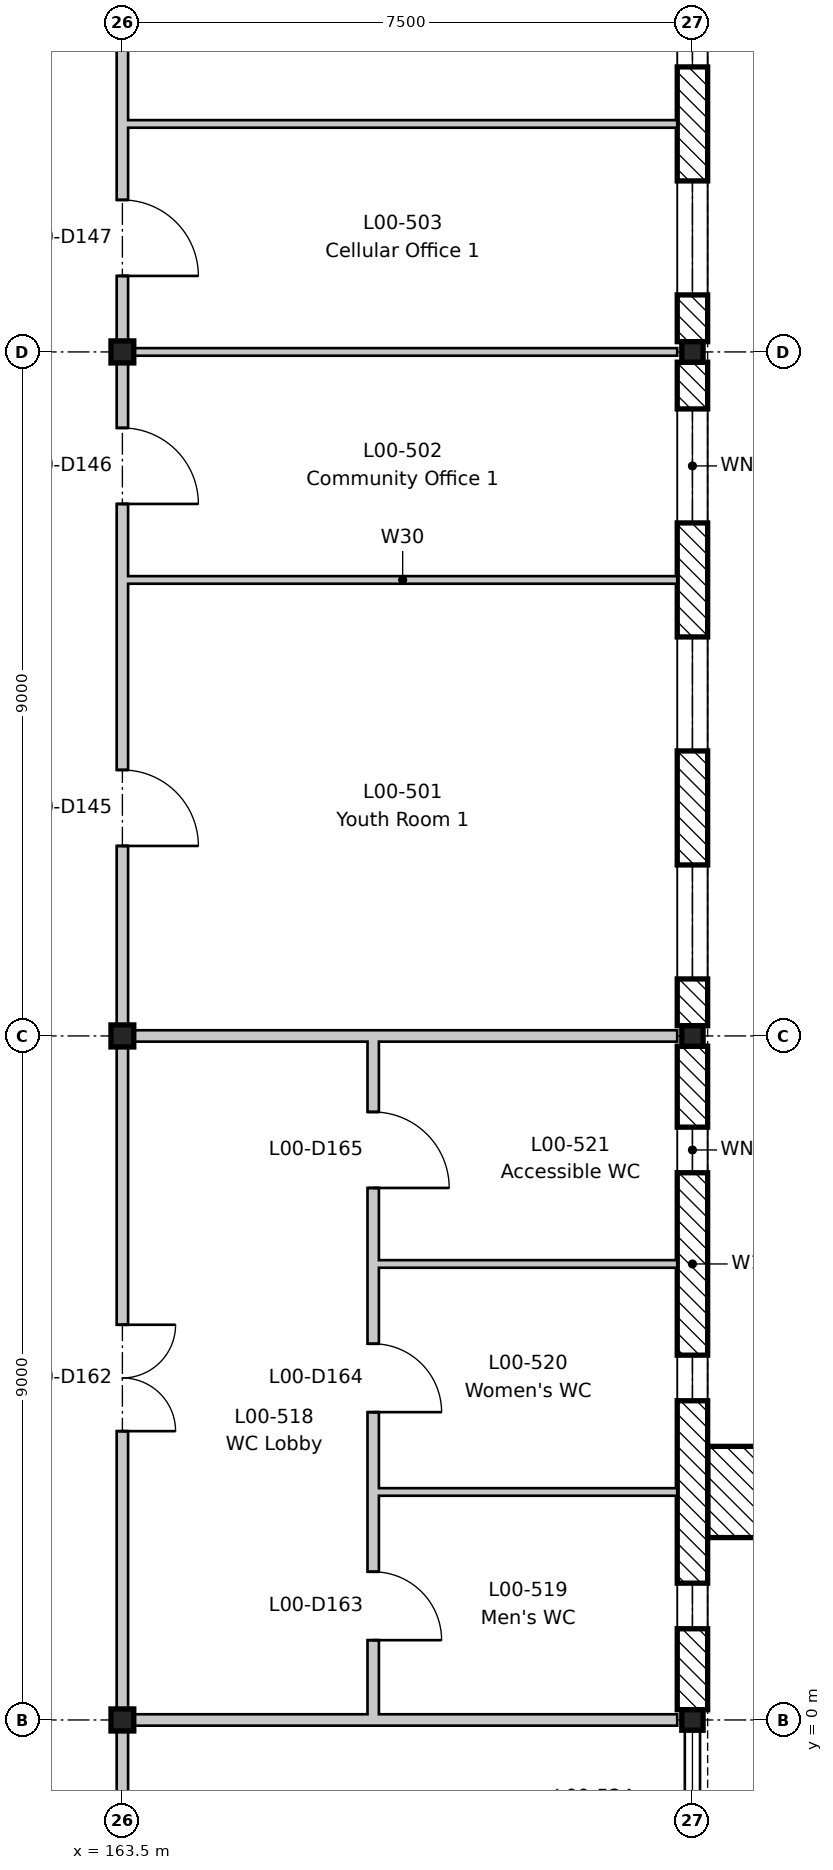
"""IFC4 building model, lengths in metres.
Left out: names, types, materials, properties, quantities, classifications, styles, units other than length and angle.
Written with IfcOpenShell. Run it as: python <this file> out.ifc"""

import sys

from ifc_helpers import new_model, si_unit, direction, frame, frame_2d, origin, origin_2d, place, context, subcontext, project, spatial, rectangle, i_section, extrude, element, fill, save


model = new_model("IFC4")
c1 = context("Model", 3, precision=1e-05, world=origin(), true_north=direction((0.0, 1.0)))
c2 = subcontext(c1, "Body", "Model", "MODEL_VIEW")
j1 = project(units=[si_unit("LENGTHUNIT", "METRE"), si_unit("PLANEANGLEUNIT", "RADIAN")], contexts=[c1])
p1 = place(None, origin())
s1 = spatial("IfcSite", under=j1, at=p1, CompositionType="ELEMENT")
p2 = place(p1, origin())
s2 = spatial("IfcBuilding", under=s1, at=p2, CompositionType="ELEMENT")
p3 = place(p2, origin())
s3 = spatial("IfcBuildingStorey", under=s2, at=p3, CompositionType="ELEMENT", Elevation=0.0)
for number, where, z_axis, x_axis in (
    (1, (163.5, 0.0, -0.6), (0.0, 0.0, 1.0), (1.0, 0.0, 0.0)),
    (2, (163.5, 9.0, -0.6), (0.0, 0.0, 1.0), (1.0, 0.0, 0.0)),
    (3, (163.5, 18.0, -0.6), (0.0, 0.0, 1.0), (1.0, 0.0, 0.0)),
):
    element("IfcColumn", number, at=place(p3, frame(where, z_axis=z_axis, x_axis=x_axis)), inside=s3, PredefinedType="COLUMN", context=c2, shape_type="SweptSolid", body=[
        extrude(i_section(OverallWidth=0.3, OverallDepth=0.29, WebThickness=0.009, FlangeThickness=0.014, FilletRadius=0.027, at=origin_2d()), origin(), (0.0, 0.0, 1.0), 5.8),
    ])
for number, where, z_axis, x_axis in (
    (4, (171.0, 0.0, -0.6), (0.0, 0.0, 1.0), (1.0, 0.0, 0.0)),
    (5, (171.0, 9.0, -0.6), (0.0, 0.0, 1.0), (1.0, 0.0, 0.0)),
    (6, (171.0, 18.0, -0.6), (0.0, 0.0, 1.0), (1.0, 0.0, 0.0)),
):
    element("IfcColumn", number, at=place(p3, frame(where, z_axis=z_axis, x_axis=x_axis)), inside=s3, PredefinedType="COLUMN", context=c2, shape_type="SweptSolid", body=[
        extrude(i_section(OverallWidth=0.28, OverallDepth=0.27, WebThickness=0.008, FlangeThickness=0.013, FilletRadius=0.024, at=origin_2d()), origin(), (0.0, 0.0, 1.0), 5.8),
    ])
p4 = place(p3, frame((171.0, 8.865, 0.0), z_axis=(0.0, 0.0, 1.0), x_axis=(0.0, -1.0, 0.0)))
e7 = element("IfcWall", 7, at=p4, inside=s3, PredefinedType="STANDARD", context=c2, shape_type="SweptSolid", body=[
    extrude(rectangle(XDim=8.73, YDim=0.4, at=frame_2d((4.365, 0.0))), origin(), (0.0, 0.0, 1.0), 4.8),
])
p5 = place(p4, frame((7.065, 0.0, 1.5)))
e8 = element("IfcOpeningElement", 8, at=p5, cuts=e7, PredefinedType="OPENING", context=c2, shape_type="SweptSolid", body=[
    extrude(rectangle(XDim=0.6, YDim=1.2, at=frame_2d((0.3, 0.6))), frame((0.0, 0.21, 0.0), z_axis=(0.0, -1.0, 0.0), x_axis=(1.0, 0.0, 0.0)), (0.0, 0.0, 1.0), 0.42),
])
p6 = place(p4, frame((4.065, 0.0, 1.5)))
e9 = element("IfcOpeningElement", 9, at=p6, cuts=e7, PredefinedType="OPENING", context=c2, shape_type="SweptSolid", body=[
    extrude(rectangle(XDim=0.6, YDim=1.2, at=frame_2d((0.3, 0.6))), frame((0.0, 0.21, 0.0), z_axis=(0.0, -1.0, 0.0), x_axis=(1.0, 0.0, 0.0)), (0.0, 0.0, 1.0), 0.42),
])
p7 = place(p4, frame((1.065, 0.0, 1.5)))
e10 = element("IfcOpeningElement", 10, at=p7, cuts=e7, PredefinedType="OPENING", context=c2, shape_type="SweptSolid", body=[
    extrude(rectangle(XDim=0.6, YDim=1.2, at=frame_2d((0.3, 0.6))), frame((0.0, 0.21, 0.0), z_axis=(0.0, -1.0, 0.0), x_axis=(1.0, 0.0, 0.0)), (0.0, 0.0, 1.0), 0.42),
])
p8 = place(p3, frame((171.0, 17.865, 0.0), z_axis=(0.0, 0.0, 1.0), x_axis=(0.0, -1.0, 0.0)))
e11 = element("IfcWall", 11, at=p8, inside=s3, PredefinedType="STANDARD", context=c2, shape_type="SweptSolid", body=[
    extrude(rectangle(XDim=8.73, YDim=0.4, at=frame_2d((4.365, 0.0))), origin(), (0.0, 0.0, 1.0), 4.8),
])
p9 = place(p8, frame((6.615, 0.0, 0.3)))
e12 = element("IfcOpeningElement", 12, at=p9, cuts=e11, PredefinedType="OPENING", context=c2, shape_type="SweptSolid", body=[
    extrude(rectangle(XDim=1.5, YDim=3.3, at=frame_2d((0.75, 1.65))), frame((0.0, 0.21, 0.0), z_axis=(0.0, -1.0, 0.0), x_axis=(1.0, 0.0, 0.0)), (0.0, 0.0, 1.0), 0.42),
])
p10 = place(p8, frame((3.615, 0.0, 0.3)))
e13 = element("IfcOpeningElement", 13, at=p10, cuts=e11, PredefinedType="OPENING", context=c2, shape_type="SweptSolid", body=[
    extrude(rectangle(XDim=1.5, YDim=3.3, at=frame_2d((0.75, 1.65))), frame((0.0, 0.21, 0.0), z_axis=(0.0, -1.0, 0.0), x_axis=(1.0, 0.0, 0.0)), (0.0, 0.0, 1.0), 0.42),
])
p11 = place(p8, frame((0.615, 0.0, 0.3)))
e14 = element("IfcOpeningElement", 14, at=p11, cuts=e11, PredefinedType="OPENING", context=c2, shape_type="SweptSolid", body=[
    extrude(rectangle(XDim=1.5, YDim=3.3, at=frame_2d((0.75, 1.65))), frame((0.0, 0.21, 0.0), z_axis=(0.0, -1.0, 0.0), x_axis=(1.0, 0.0, 0.0)), (0.0, 0.0, 1.0), 0.42),
])
p12 = place(p3, frame((171.0, 26.865, 0.0), z_axis=(0.0, 0.0, 1.0), x_axis=(0.0, -1.0, 0.0)))
e15 = element("IfcWall", 15, at=p12, inside=s3, PredefinedType="STANDARD", context=c2, shape_type="SweptSolid", body=[
    extrude(rectangle(XDim=8.73, YDim=0.4, at=frame_2d((4.365, 0.0))), origin(), (0.0, 0.0, 1.0), 4.8),
])
p13 = place(p12, frame((6.615, 0.0, 0.3)))
e16 = element("IfcOpeningElement", 16, at=p13, cuts=e15, PredefinedType="OPENING", context=c2, shape_type="SweptSolid", body=[
    extrude(rectangle(XDim=1.5, YDim=3.3, at=frame_2d((0.75, 1.65))), frame((0.0, 0.21, 0.0), z_axis=(0.0, -1.0, 0.0), x_axis=(1.0, 0.0, 0.0)), (0.0, 0.0, 1.0), 0.42),
])
p14 = place(p12, frame((3.615, 0.0, 0.3)))
e17 = element("IfcOpeningElement", 17, at=p14, cuts=e15, PredefinedType="OPENING", context=c2, shape_type="SweptSolid", body=[
    extrude(rectangle(XDim=1.5, YDim=3.3, at=frame_2d((0.75, 1.65))), frame((0.0, 0.21, 0.0), z_axis=(0.0, -1.0, 0.0), x_axis=(1.0, 0.0, 0.0)), (0.0, 0.0, 1.0), 0.42),
])
p15 = place(p12, frame((0.615, 0.0, 0.3)))
e18 = element("IfcOpeningElement", 18, at=p15, cuts=e15, PredefinedType="OPENING", context=c2, shape_type="SweptSolid", body=[
    extrude(rectangle(XDim=1.5, YDim=3.3, at=frame_2d((0.75, 1.65))), frame((0.0, 0.21, 0.0), z_axis=(0.0, -1.0, 0.0), x_axis=(1.0, 0.0, 0.0)), (0.0, 0.0, 1.0), 0.42),
])
p16 = place(p3, frame((171.8, 2.4, 0.0), z_axis=(0.0, 0.0, 1.0), x_axis=(0.0, 1.0, 0.0)))
e19 = element("IfcWall", 19, at=p16, inside=s3, PredefinedType="STANDARD", context=c2, shape_type="SweptSolid", body=[
    extrude(rectangle(XDim=1.2, YDim=1.2, at=frame_2d((0.6, 0.0))), origin(), (0.0, 0.0, 1.0), 5.4),
])
p17 = place(p3, frame((163.575, 9.0, 0.0), z_axis=(0.0, 0.0, 1.0), x_axis=(1.0, 0.0, 0.0)))
e20 = element("IfcWall", 20, at=p17, inside=s3, PredefinedType="PARTITIONING", context=c2, shape_type="SweptSolid", body=[
    extrude(rectangle(XDim=7.225, YDim=0.15, at=frame_2d((3.613, 0.0))), origin(), (0.0, 0.0, 1.0), 4.85),
])
p18 = place(p3, frame((163.575, 15.0, 0.0), z_axis=(0.0, 0.0, 1.0), x_axis=(1.0, 0.0, 0.0)))
e21 = element("IfcWall", 21, at=p18, inside=s3, PredefinedType="PARTITIONING", context=c2, shape_type="SweptSolid", body=[
    extrude(rectangle(XDim=7.225, YDim=0.1, at=frame_2d((3.613, 0.0))), origin(), (0.0, 0.0, 1.0), 5.2),
])
p19 = place(p3, frame((163.575, 18.0, 0.0), z_axis=(0.0, 0.0, 1.0), x_axis=(1.0, 0.0, 0.0)))
e22 = element("IfcWall", 22, at=p19, inside=s3, PredefinedType="PARTITIONING", context=c2, shape_type="SweptSolid", body=[
    extrude(rectangle(XDim=7.225, YDim=0.1, at=frame_2d((3.613, 0.0))), origin(), (0.0, 0.0, 1.0), 4.85),
])
p20 = place(p3, frame((163.575, 21.0, 0.0), z_axis=(0.0, 0.0, 1.0), x_axis=(1.0, 0.0, 0.0)))
e23 = element("IfcWall", 23, at=p20, inside=s3, PredefinedType="PARTITIONING", context=c2, shape_type="SweptSolid", body=[
    extrude(rectangle(XDim=7.225, YDim=0.1, at=frame_2d((3.613, 0.0))), origin(), (0.0, 0.0, 1.0), 5.2),
])
p21 = place(p3, frame((163.575, 0.0, 0.0), z_axis=(0.0, 0.0, 1.0), x_axis=(1.0, 0.0, 0.0)))
e24 = element("IfcWall", 24, at=p21, inside=s3, PredefinedType="PARTITIONING", context=c2, shape_type="SweptSolid", body=[
    extrude(rectangle(XDim=7.225, YDim=0.15, at=frame_2d((3.613, 0.0))), origin(), (0.0, 0.0, 1.0), 4.85),
])
p22 = place(p3, frame((163.5, -8.8, 0.0), z_axis=(0.0, 0.0, 1.0), x_axis=(0.0, 1.0, 0.0)))
e25 = element("IfcWall", 25, at=p22, inside=s3, PredefinedType="PARTITIONING", context=c2, shape_type="SweptSolid", body=[
    extrude(rectangle(XDim=62.6, YDim=0.15, at=frame_2d((31.3, 0.0))), origin(), (0.0, 0.0, 1.0), 4.68),
])
p23 = place(p22, frame((20.3, 0.0, 0.0)))
e26 = element("IfcOpeningElement", 26, at=p23, cuts=e25, PredefinedType="OPENING", context=c2, shape_type="SweptSolid", body=[
    extrude(rectangle(XDim=1.0, YDim=2.1, at=frame_2d((0.5, 1.05))), frame((0.0, 0.085, 0.0), z_axis=(0.0, -1.0, 0.0), x_axis=(1.0, 0.0, 0.0)), (0.0, 0.0, 1.0), 0.17),
])
p24 = place(p22, frame((24.8, 0.0, 0.0)))
e27 = element("IfcOpeningElement", 27, at=p24, cuts=e25, PredefinedType="OPENING", context=c2, shape_type="SweptSolid", body=[
    extrude(rectangle(XDim=1.0, YDim=2.1, at=frame_2d((0.5, 1.05))), frame((0.0, 0.085, 0.0), z_axis=(0.0, -1.0, 0.0), x_axis=(1.0, 0.0, 0.0)), (0.0, 0.0, 1.0), 0.17),
])
p25 = place(p22, frame((27.8, 0.0, 0.0)))
e28 = element("IfcOpeningElement", 28, at=p25, cuts=e25, PredefinedType="OPENING", context=c2, shape_type="SweptSolid", body=[
    extrude(rectangle(XDim=1.0, YDim=2.1, at=frame_2d((0.5, 1.05))), frame((0.0, 0.085, 0.0), z_axis=(0.0, -1.0, 0.0), x_axis=(1.0, 0.0, 0.0)), (0.0, 0.0, 1.0), 0.17),
])
p26 = place(p22, frame((32.3, 0.0, 0.0)))
e29 = element("IfcOpeningElement", 29, at=p26, cuts=e25, PredefinedType="OPENING", context=c2, shape_type="SweptSolid", body=[
    extrude(rectangle(XDim=1.0, YDim=2.1, at=frame_2d((0.5, 1.05))), frame((0.0, 0.085, 0.0), z_axis=(0.0, -1.0, 0.0), x_axis=(1.0, 0.0, 0.0)), (0.0, 0.0, 1.0), 0.17),
])
p27 = place(p22, frame((45.8, 0.0, 0.0)))
e30 = element("IfcOpeningElement", 30, at=p27, cuts=e25, PredefinedType="OPENING", context=c2, shape_type="SweptSolid", body=[
    extrude(rectangle(XDim=1.0, YDim=2.1, at=frame_2d((0.5, 1.05))), frame((0.0, 0.085, 0.0), z_axis=(0.0, -1.0, 0.0), x_axis=(1.0, 0.0, 0.0)), (0.0, 0.0, 1.0), 0.17),
])
p28 = place(p22, frame((50.3, 0.0, 0.0)))
e31 = element("IfcOpeningElement", 31, at=p28, cuts=e25, PredefinedType="OPENING", context=c2, shape_type="SweptSolid", body=[
    extrude(rectangle(XDim=1.0, YDim=2.1, at=frame_2d((0.5, 1.05))), frame((0.0, 0.085, 0.0), z_axis=(0.0, -1.0, 0.0), x_axis=(1.0, 0.0, 0.0)), (0.0, 0.0, 1.0), 0.17),
])
p29 = place(p22, frame((12.6, 0.0, 0.0)))
e32 = element("IfcOpeningElement", 32, at=p29, cuts=e25, PredefinedType="OPENING", context=c2, shape_type="SweptSolid", body=[
    extrude(rectangle(XDim=1.4, YDim=2.1, at=frame_2d((0.7, 1.05))), frame((0.0, 0.085, 0.0), z_axis=(0.0, -1.0, 0.0), x_axis=(1.0, 0.0, 0.0)), (0.0, 0.0, 1.0), 0.17),
])
p30 = place(p22, frame((3.6, 0.0, 0.0)))
e33 = element("IfcOpeningElement", 33, at=p30, cuts=e25, PredefinedType="OPENING", context=c2, shape_type="SweptSolid", body=[
    extrude(rectangle(XDim=1.4, YDim=2.1, at=frame_2d((0.7, 1.05))), frame((0.0, 0.085, 0.0), z_axis=(0.0, -1.0, 0.0), x_axis=(1.0, 0.0, 0.0)), (0.0, 0.0, 1.0), 0.17),
])
p31 = place(p22, frame((57.6, 0.0, 0.0)))
e34 = element("IfcOpeningElement", 34, at=p31, cuts=e25, PredefinedType="OPENING", context=c2, shape_type="SweptSolid", body=[
    extrude(rectangle(XDim=1.4, YDim=2.1, at=frame_2d((0.7, 1.05))), frame((0.0, 0.085, 0.0), z_axis=(0.0, -1.0, 0.0), x_axis=(1.0, 0.0, 0.0)), (0.0, 0.0, 1.0), 0.17),
])
p32 = place(p22, frame((36.75, 0.0, 0.0)))
e35 = element("IfcOpeningElement", 35, at=p32, cuts=e25, PredefinedType="OPENING", context=c2, shape_type="SweptSolid", body=[
    extrude(rectangle(XDim=1.0, YDim=2.1, at=frame_2d((0.5, 1.05))), frame((0.0, 0.085, 0.0), z_axis=(0.0, -1.0, 0.0), x_axis=(1.0, 0.0, 0.0)), (0.0, 0.0, 1.0), 0.17),
])
p33 = place(p22, frame((42.65, 0.0, 0.0)))
e36 = element("IfcOpeningElement", 36, at=p33, cuts=e25, PredefinedType="OPENING", context=c2, shape_type="SweptSolid", body=[
    extrude(rectangle(XDim=1.4, YDim=2.1, at=frame_2d((0.7, 1.05))), frame((0.0, 0.085, 0.0), z_axis=(0.0, -1.0, 0.0), x_axis=(1.0, 0.0, 0.0)), (0.0, 0.0, 1.0), 0.17),
])
p34 = place(p3, frame((166.8, 0.075, 0.0), z_axis=(0.0, 0.0, 1.0), x_axis=(0.0, 1.0, 0.0)))
e37 = element("IfcWall", 37, at=p34, inside=s3, PredefinedType="PARTITIONING", context=c2, shape_type="SweptSolid", body=[
    extrude(rectangle(XDim=8.85, YDim=0.15, at=frame_2d((4.425, 0.0))), origin(), (0.0, 0.0, 1.0), 5.2),
])
p35 = place(p34, frame((0.975, 0.0, 0.0)))
e38 = element("IfcOpeningElement", 38, at=p35, cuts=e37, PredefinedType="OPENING", context=c2, shape_type="SweptSolid", body=[
    extrude(rectangle(XDim=0.9, YDim=2.1, at=frame_2d((0.45, 1.05))), frame((0.0, 0.085, 0.0), z_axis=(0.0, -1.0, 0.0), x_axis=(1.0, 0.0, 0.0)), (0.0, 0.0, 1.0), 0.17),
])
p36 = place(p34, frame((3.975, 0.0, 0.0)))
e39 = element("IfcOpeningElement", 39, at=p36, cuts=e37, PredefinedType="OPENING", context=c2, shape_type="SweptSolid", body=[
    extrude(rectangle(XDim=0.9, YDim=2.1, at=frame_2d((0.45, 1.05))), frame((0.0, 0.085, 0.0), z_axis=(0.0, -1.0, 0.0), x_axis=(1.0, 0.0, 0.0)), (0.0, 0.0, 1.0), 0.17),
])
p37 = place(p34, frame((6.925, 0.0, 0.0)))
e40 = element("IfcOpeningElement", 40, at=p37, cuts=e37, PredefinedType="OPENING", context=c2, shape_type="SweptSolid", body=[
    extrude(rectangle(XDim=1.0, YDim=2.1, at=frame_2d((0.5, 1.05))), frame((0.0, 0.085, 0.0), z_axis=(0.0, -1.0, 0.0), x_axis=(1.0, 0.0, 0.0)), (0.0, 0.0, 1.0), 0.17),
])
for number, where, z_axis, x_axis in (
    (41, (166.875, 3.0, 0.0), (0.0, 0.0, 1.0), (1.0, 0.0, 0.0)),
    (42, (166.875, 6.0, 0.0), (0.0, 0.0, 1.0), (1.0, 0.0, 0.0)),
):
    element("IfcWall", number, at=place(p3, frame(where, z_axis=z_axis, x_axis=x_axis)), inside=s3, PredefinedType="PARTITIONING", context=c2, shape_type="SweptSolid", body=[
        extrude(rectangle(XDim=3.925, YDim=0.1, at=frame_2d((1.962, 0.0))), origin(), (0.0, 0.0, 1.0), 5.2),
    ])
p38 = place(p5, origin())
e43 = element("IfcWindow", 43, at=p38, inside=s3, PartitioningType="SINGLE_PANEL", PredefinedType="WINDOW", context=c2, shape_type="SweptSolid", body=[
    extrude(rectangle(XDim=0.6, YDim=1.2, at=frame_2d((0.3, 0.6))), frame((0.0, -0.12, 0.0), z_axis=(0.0, -1.0, 0.0), x_axis=(1.0, 0.0, 0.0)), (0.0, 0.0, 1.0), 0.06),
])
fill(e8, e43)
p39 = place(p6, origin())
e44 = element("IfcWindow", 44, at=p39, inside=s3, PartitioningType="SINGLE_PANEL", PredefinedType="WINDOW", context=c2, shape_type="SweptSolid", body=[
    extrude(rectangle(XDim=0.6, YDim=1.2, at=frame_2d((0.3, 0.6))), frame((0.0, -0.12, 0.0), z_axis=(0.0, -1.0, 0.0), x_axis=(1.0, 0.0, 0.0)), (0.0, 0.0, 1.0), 0.06),
])
fill(e9, e44)
p40 = place(p7, origin())
e45 = element("IfcWindow", 45, at=p40, inside=s3, PartitioningType="SINGLE_PANEL", PredefinedType="WINDOW", context=c2, shape_type="SweptSolid", body=[
    extrude(rectangle(XDim=0.6, YDim=1.2, at=frame_2d((0.3, 0.6))), frame((0.0, -0.12, 0.0), z_axis=(0.0, -1.0, 0.0), x_axis=(1.0, 0.0, 0.0)), (0.0, 0.0, 1.0), 0.06),
])
fill(e10, e45)
p41 = place(p9, origin())
e46 = element("IfcWindow", 46, at=p41, inside=s3, PartitioningType="SINGLE_PANEL", PredefinedType="WINDOW", context=c2, shape_type="SweptSolid", body=[
    extrude(rectangle(XDim=1.5, YDim=3.3, at=frame_2d((0.75, 1.65))), frame((0.0, -0.12, 0.0), z_axis=(0.0, -1.0, 0.0), x_axis=(1.0, 0.0, 0.0)), (0.0, 0.0, 1.0), 0.06),
])
fill(e12, e46)
p42 = place(p10, origin())
e47 = element("IfcWindow", 47, at=p42, inside=s3, PartitioningType="SINGLE_PANEL", PredefinedType="WINDOW", context=c2, shape_type="SweptSolid", body=[
    extrude(rectangle(XDim=1.5, YDim=3.3, at=frame_2d((0.75, 1.65))), frame((0.0, -0.12, 0.0), z_axis=(0.0, -1.0, 0.0), x_axis=(1.0, 0.0, 0.0)), (0.0, 0.0, 1.0), 0.06),
])
fill(e13, e47)
p43 = place(p11, origin())
e48 = element("IfcWindow", 48, at=p43, inside=s3, PartitioningType="SINGLE_PANEL", PredefinedType="WINDOW", context=c2, shape_type="SweptSolid", body=[
    extrude(rectangle(XDim=1.5, YDim=3.3, at=frame_2d((0.75, 1.65))), frame((0.0, -0.12, 0.0), z_axis=(0.0, -1.0, 0.0), x_axis=(1.0, 0.0, 0.0)), (0.0, 0.0, 1.0), 0.06),
])
fill(e14, e48)
p44 = place(p13, origin())
e49 = element("IfcWindow", 49, at=p44, inside=s3, PartitioningType="SINGLE_PANEL", PredefinedType="WINDOW", context=c2, shape_type="SweptSolid", body=[
    extrude(rectangle(XDim=1.5, YDim=3.3, at=frame_2d((0.75, 1.65))), frame((0.0, -0.12, 0.0), z_axis=(0.0, -1.0, 0.0), x_axis=(1.0, 0.0, 0.0)), (0.0, 0.0, 1.0), 0.06),
])
fill(e16, e49)
p45 = place(p14, origin())
e50 = element("IfcWindow", 50, at=p45, inside=s3, PartitioningType="SINGLE_PANEL", PredefinedType="WINDOW", context=c2, shape_type="SweptSolid", body=[
    extrude(rectangle(XDim=1.5, YDim=3.3, at=frame_2d((0.75, 1.65))), frame((0.0, -0.12, 0.0), z_axis=(0.0, -1.0, 0.0), x_axis=(1.0, 0.0, 0.0)), (0.0, 0.0, 1.0), 0.06),
])
fill(e17, e50)
p46 = place(p23, frame((1.0, 0.0, 0.0), z_axis=(0.0, 0.0, 1.0), x_axis=(-1.0, 0.0, 0.0)))
e51 = element("IfcDoor", 51, at=p46, inside=s3, OperationType="SINGLE_SWING_RIGHT", PredefinedType="DOOR", context=c2, shape_type="SweptSolid", body=[
    extrude(rectangle(XDim=1.0, YDim=2.1, at=frame_2d((0.5, 1.05))), frame((0.0, 0.025, 0.0), z_axis=(0.0, -1.0, 0.0), x_axis=(1.0, 0.0, 0.0)), (0.0, 0.0, 1.0), 0.05),
])
fill(e26, e51)
p47 = place(p24, frame((1.0, 0.0, 0.0), z_axis=(0.0, 0.0, 1.0), x_axis=(-1.0, 0.0, 0.0)))
e52 = element("IfcDoor", 52, at=p47, inside=s3, OperationType="SINGLE_SWING_RIGHT", PredefinedType="DOOR", context=c2, shape_type="SweptSolid", body=[
    extrude(rectangle(XDim=1.0, YDim=2.1, at=frame_2d((0.5, 1.05))), frame((0.0, 0.025, 0.0), z_axis=(0.0, -1.0, 0.0), x_axis=(1.0, 0.0, 0.0)), (0.0, 0.0, 1.0), 0.05),
])
fill(e27, e52)
p48 = place(p25, frame((1.0, 0.0, 0.0), z_axis=(0.0, 0.0, 1.0), x_axis=(-1.0, 0.0, 0.0)))
e53 = element("IfcDoor", 53, at=p48, inside=s3, OperationType="SINGLE_SWING_RIGHT", PredefinedType="DOOR", context=c2, shape_type="SweptSolid", body=[
    extrude(rectangle(XDim=1.0, YDim=2.1, at=frame_2d((0.5, 1.05))), frame((0.0, 0.025, 0.0), z_axis=(0.0, -1.0, 0.0), x_axis=(1.0, 0.0, 0.0)), (0.0, 0.0, 1.0), 0.05),
])
fill(e28, e53)
p49 = place(p29, frame((1.4, 0.0, 0.0), z_axis=(0.0, 0.0, 1.0), x_axis=(-1.0, 0.0, 0.0)))
e54 = element("IfcDoor", 54, at=p49, inside=s3, OperationType="DOUBLE_DOOR_SINGLE_SWING", PredefinedType="DOOR", context=c2, shape_type="SweptSolid", body=[
    extrude(rectangle(XDim=1.4, YDim=2.1, at=frame_2d((0.7, 1.05))), frame((0.0, 0.025, 0.0), z_axis=(0.0, -1.0, 0.0), x_axis=(1.0, 0.0, 0.0)), (0.0, 0.0, 1.0), 0.05),
])
fill(e32, e54)
p50 = place(p35, frame((0.9, 0.0, 0.0), z_axis=(0.0, 0.0, 1.0), x_axis=(-1.0, 0.0, 0.0)))
e55 = element("IfcDoor", 55, at=p50, inside=s3, OperationType="SINGLE_SWING_RIGHT", PredefinedType="DOOR", context=c2, shape_type="SweptSolid", body=[
    extrude(rectangle(XDim=0.9, YDim=2.1, at=frame_2d((0.45, 1.05))), frame((0.0, 0.025, 0.0), z_axis=(0.0, -1.0, 0.0), x_axis=(1.0, 0.0, 0.0)), (0.0, 0.0, 1.0), 0.05),
])
fill(e38, e55)
p51 = place(p36, frame((0.9, 0.0, 0.0), z_axis=(0.0, 0.0, 1.0), x_axis=(-1.0, 0.0, 0.0)))
e56 = element("IfcDoor", 56, at=p51, inside=s3, OperationType="SINGLE_SWING_RIGHT", PredefinedType="DOOR", context=c2, shape_type="SweptSolid", body=[
    extrude(rectangle(XDim=0.9, YDim=2.1, at=frame_2d((0.45, 1.05))), frame((0.0, 0.025, 0.0), z_axis=(0.0, -1.0, 0.0), x_axis=(1.0, 0.0, 0.0)), (0.0, 0.0, 1.0), 0.05),
])
fill(e39, e56)
p52 = place(p37, frame((1.0, 0.0, 0.0), z_axis=(0.0, 0.0, 1.0), x_axis=(-1.0, 0.0, 0.0)))
e57 = element("IfcDoor", 57, at=p52, inside=s3, OperationType="SINGLE_SWING_RIGHT", PredefinedType="DOOR", context=c2, shape_type="SweptSolid", body=[
    extrude(rectangle(XDim=1.0, YDim=2.1, at=frame_2d((0.5, 1.05))), frame((0.0, 0.025, 0.0), z_axis=(0.0, -1.0, 0.0), x_axis=(1.0, 0.0, 0.0)), (0.0, 0.0, 1.0), 0.05),
])
fill(e40, e57)
save(model, sys.argv[1])
